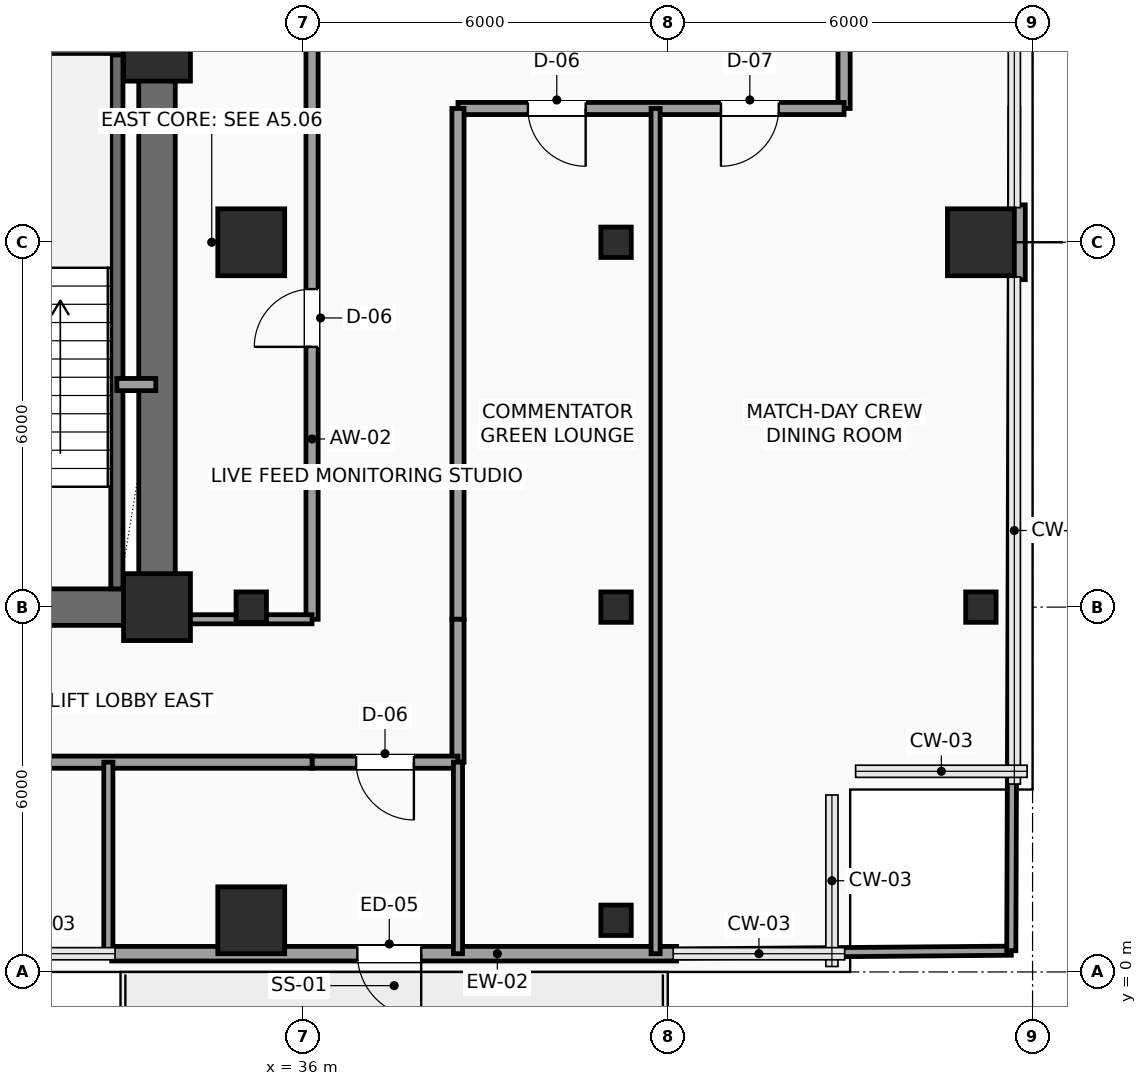
"""IFC4 building model, lengths in metres.
Left out: names, types, materials, properties, quantities, classifications, styles, units other than length and angle.
Written with IfcOpenShell. Run it as: python <this file> out.ifc"""

import sys

from ifc_helpers import new_model, si_unit, direction, frame, frame_2d, origin, origin_2d, place, context, subcontext, project, spatial, rectangle, hollow_rectangle, extrude, element, fill, save


model = new_model("IFC4")
c1 = context("Model", 3, precision=1e-05, world=origin(), true_north=direction((0.0, 1.0)))
c2 = subcontext(c1, "Body", "Model", "MODEL_VIEW")
j1 = project(units=[si_unit("LENGTHUNIT", "METRE"), si_unit("PLANEANGLEUNIT", "RADIAN")], contexts=[c1])
p1 = place(None, origin())
s1 = spatial("IfcSite", under=j1, at=p1, CompositionType="ELEMENT")
p2 = place(p1, origin())
s2 = spatial("IfcBuilding", under=s1, at=p2, CompositionType="ELEMENT")
p3 = place(p2, frame((0.0, 0.0, 107.1)))
s3 = spatial("IfcBuildingStorey", under=s2, at=p3, CompositionType="ELEMENT", Elevation=107.1)
for number, where, z_axis, x_axis in (
    (1, (33.6, 6.0, 0.0), (0.0, 0.0, 1.0), (1.0, 0.0, 0.0)),
    (2, (33.6, 15.2, 0.0), (0.0, 0.0, 1.0), (1.0, 0.0, 0.0)),
    (3, (35.15, 0.85, 0.0), (0.0, 0.0, 1.0), (1.0, 0.0, 0.0)),
):
    element("IfcColumn", number, at=place(p3, frame(where, z_axis=z_axis, x_axis=x_axis)), inside=s3, PredefinedType="COLUMN", context=c2, shape_type="SweptSolid", body=[
        extrude(rectangle(XDim=1.1, YDim=1.1, at=origin_2d()), origin(), (0.0, 0.0, 1.0), 3.75),
    ])
p4 = place(p3, frame((35.15, 6.0, 0.0), z_axis=(0.0, 0.0, 1.0), x_axis=(1.0, 0.0, 0.0)))
e4 = element("IfcColumn", 4, at=p4, inside=s3, PredefinedType="COLUMN", context=c2, shape_type="SweptSolid", body=[
    extrude(hollow_rectangle(XDim=0.5, YDim=0.5, WallThickness=0.025, InnerFilletRadius=0.025, OuterFilletRadius=0.04, at=origin_2d()), origin(), (0.0, 0.0, 1.0), 3.75),
])
p5 = place(p3, frame((35.15, 12.0, 0.0), z_axis=(0.0, 0.0, 1.0), x_axis=(1.0, 0.0, 0.0)))
e5 = element("IfcColumn", 5, at=p5, inside=s3, PredefinedType="COLUMN", context=c2, shape_type="SweptSolid", body=[
    extrude(rectangle(XDim=1.1, YDim=1.1, at=origin_2d()), origin(), (0.0, 0.0, 1.0), 3.75),
])
for number, where, z_axis, x_axis in (
    (6, (41.15, 0.85, 0.0), (0.0, 0.0, 1.0), (1.0, 0.0, 0.0)),
    (7, (41.15, 6.0, 0.0), (0.0, 0.0, 1.0), (1.0, 0.0, 0.0)),
    (8, (41.15, 12.0, 0.0), (0.0, 0.0, 1.0), (1.0, 0.0, 0.0)),
    (9, (47.15, 6.0, 0.0), (0.0, 0.0, 1.0), (1.0, 0.0, 0.0)),
):
    element("IfcColumn", number, at=place(p3, frame(where, z_axis=z_axis, x_axis=x_axis)), inside=s3, PredefinedType="COLUMN", context=c2, shape_type="SweptSolid", body=[
        extrude(hollow_rectangle(XDim=0.5, YDim=0.5, WallThickness=0.025, InnerFilletRadius=0.025, OuterFilletRadius=0.04, at=origin_2d()), origin(), (0.0, 0.0, 1.0), 3.75),
    ])
p6 = place(p3, frame((47.15, 12.0, 0.0), z_axis=(0.0, 0.0, 1.0), x_axis=(1.0, 0.0, 0.0)))
e10 = element("IfcColumn", 10, at=p6, inside=s3, PredefinedType="COLUMN", context=c2, shape_type="SweptSolid", body=[
    extrude(rectangle(XDim=1.1, YDim=1.1, at=origin_2d()), origin(), (0.0, 0.0, 1.0), 3.75),
])
p7 = place(p3, frame((42.145, 0.3, 0.0), z_axis=(0.0, 0.0, 1.0), x_axis=(-1.0, 0.0, 0.0)))
e11 = element("IfcWall", 11, at=p7, inside=s3, PredefinedType="SOLIDWALL", context=c2, shape_type="SweptSolid", body=[
    extrude(rectangle(XDim=9.29, YDim=0.24, at=frame_2d((4.645, 0.0))), origin(), (0.0, 0.0, 1.0), 3.475),
])
p8 = place(p7, frame((4.2, 0.0, 0.0)))
e12 = element("IfcOpeningElement", 12, at=p8, cuts=e11, PredefinedType="OPENING", context=c2, shape_type="SweptSolid", body=[
    extrude(rectangle(XDim=1.05, YDim=2.2, at=frame_2d((0.525, 1.1))), frame((0.0, 0.13, 0.0), z_axis=(0.0, -1.0, 0.0), x_axis=(1.0, 0.0, 0.0)), (0.0, 0.0, 1.0), 0.26),
])
p9 = place(p3, frame((47.76, 12.615, 0.0), z_axis=(0.0, 0.0, 1.0), x_axis=(0.0, -1.0, 0.0)))
e13 = element("IfcWall", 13, at=p9, inside=s3, PredefinedType="SOLIDWALL", context=c2, shape_type="SweptSolid", body=[
    extrude(rectangle(XDim=1.23, YDim=0.24, at=frame_2d((0.615, 0.0))), origin(), (0.0, 0.0, 1.0), 3.475),
])
p10 = place(p3, frame((24.0, 6.0, 0.0), z_axis=(0.0, 0.0, 1.0), x_axis=(1.0, 0.0, 0.0)))
e14 = element("IfcWall", 14, at=p10, inside=s3, PredefinedType="SHEAR", context=c2, shape_type="SweptSolid", body=[
    extrude(rectangle(XDim=9.6, YDim=0.6, at=frame_2d((4.8, 0.0))), origin(), (0.0, 0.0, 1.0), 3.475),
])
p11 = place(p3, frame((33.6, 6.0, 0.0), z_axis=(0.0, 0.0, 1.0), x_axis=(0.0, 1.0, 0.0)))
e15 = element("IfcWall", 15, at=p11, inside=s3, PredefinedType="SHEAR", context=c2, shape_type="SweptSolid", body=[
    extrude(rectangle(XDim=12.0, YDim=0.6, at=frame_2d((6.0, 0.0))), origin(), (0.0, 0.0, 1.0), 3.475),
])
p12 = place(p11, frame((10.3, 0.0, 0.0)))
e16 = element("IfcOpeningElement", 16, at=p12, cuts=e15, PredefinedType="OPENING", context=c2, shape_type="SweptSolid", body=[
    extrude(rectangle(XDim=0.9, YDim=2.15, at=frame_2d((0.45, 1.075))), frame((0.0, 0.31, 0.0), z_axis=(0.0, -1.0, 0.0), x_axis=(1.0, 0.0, 0.0)), (0.0, 0.0, 1.0), 0.62),
])
p13 = place(p3, frame((32.94, 6.3, 0.0), z_axis=(0.0, 0.0, 1.0), x_axis=(0.0, 1.0, 0.0)))
e17 = element("IfcWall", 17, at=p13, inside=s3, PredefinedType="SHEAR", context=c2, shape_type="SweptSolid", body=[
    extrude(rectangle(XDim=8.88, YDim=0.2, at=frame_2d((4.44, 0.0))), origin(), (0.0, 0.0, 1.0), 3.475),
])
p14 = place(p3, frame((29.26, 15.18, 0.0), z_axis=(0.0, 0.0, 1.0), x_axis=(1.0, 0.0, 0.0)))
e18 = element("IfcWall", 18, at=p14, inside=s3, PredefinedType="SHEAR", context=c2, shape_type="SweptSolid", body=[
    extrude(rectangle(XDim=4.04, YDim=0.2, at=frame_2d((2.02, 0.0))), origin(), (0.0, 0.0, 1.0), 3.475),
])
p15 = place(p3, frame((32.94, 9.66, 0.0), z_axis=(0.0, 0.0, 1.0), x_axis=(1.0, 0.0, 0.0)))
e19 = element("IfcWall", 19, at=p15, inside=s3, PredefinedType="SOLIDWALL", context=c2, shape_type="SweptSolid", body=[
    extrude(rectangle(XDim=0.64, YDim=0.2, at=frame_2d((0.32, 0.0))), origin(), (0.0, 0.0, 1.0), 3.475),
])
p16 = place(p3, frame((36.15, 5.8, 0.0), z_axis=(0.0, 0.0, 1.0), x_axis=(0.0, 1.0, 0.0)))
e20 = element("IfcWall", 20, at=p16, inside=s3, PredefinedType="PARTITIONING", context=c2, shape_type="SweptSolid", body=[
    extrude(rectangle(XDim=10.08, YDim=0.2, at=frame_2d((5.04, 0.0))), origin(), (0.0, 0.0, 1.0), 3.475),
])
p17 = place(p16, frame((4.48, 0.0, 0.0)))
e21 = element("IfcOpeningElement", 21, at=p17, cuts=e20, PredefinedType="OPENING", context=c2, shape_type="SweptSolid", body=[
    extrude(rectangle(XDim=0.95, YDim=2.15, at=frame_2d((0.475, 1.075))), frame((0.0, 0.11, 0.0), z_axis=(0.0, -1.0, 0.0), x_axis=(1.0, 0.0, 0.0)), (0.0, 0.0, 1.0), 0.22),
])
p18 = place(p3, frame((44.9, 16.55, 0.0), z_axis=(0.0, 0.0, 1.0), x_axis=(0.0, -1.0, 0.0)))
e22 = element("IfcWall", 22, at=p18, inside=s3, PredefinedType="PARTITIONING", context=c2, shape_type="SweptSolid", body=[
    extrude(rectangle(XDim=2.35, YDim=0.2, at=frame_2d((1.175, 0.0))), origin(), (0.0, 0.0, 1.0), 3.475),
])
p19 = place(p3, frame((44.9, 14.2, 0.0), z_axis=(0.0, 0.0, 1.0), x_axis=(-1.0, 0.0, 0.0)))
e23 = element("IfcWall", 23, at=p19, inside=s3, PredefinedType="PARTITIONING", context=c2, shape_type="SweptSolid", body=[
    extrude(rectangle(XDim=6.35, YDim=0.2, at=frame_2d((3.175, 0.0))), origin(), (0.0, 0.0, 1.0), 3.475),
])
p20 = place(p19, frame((4.25, 0.0, 0.0)))
e24 = element("IfcOpeningElement", 24, at=p20, cuts=e23, PredefinedType="OPENING", context=c2, shape_type="SweptSolid", body=[
    extrude(rectangle(XDim=0.95, YDim=2.15, at=frame_2d((0.475, 1.075))), frame((0.0, 0.11, 0.0), z_axis=(0.0, -1.0, 0.0), x_axis=(1.0, 0.0, 0.0)), (0.0, 0.0, 1.0), 0.22),
])
p21 = place(p19, frame((1.075, 0.0, 0.0)))
e25 = element("IfcOpeningElement", 25, at=p21, cuts=e23, PredefinedType="OPENING", context=c2, shape_type="SweptSolid", body=[
    extrude(rectangle(XDim=0.95, YDim=2.15, at=frame_2d((0.475, 1.075))), frame((0.0, 0.11, 0.0), z_axis=(0.0, -1.0, 0.0), x_axis=(1.0, 0.0, 0.0)), (0.0, 0.0, 1.0), 0.22),
])
p22 = place(p3, frame((38.55, 14.2, 0.0), z_axis=(0.0, 0.0, 1.0), x_axis=(0.0, -1.0, 0.0)))
e26 = element("IfcWall", 26, at=p22, inside=s3, PredefinedType="PARTITIONING", context=c2, shape_type="SweptSolid", body=[
    extrude(rectangle(XDim=8.4, YDim=0.2, at=frame_2d((4.2, 0.0))), origin(), (0.0, 0.0, 1.0), 3.475),
])
p23 = place(p3, frame((38.55, 5.8, 0.0), z_axis=(0.0, 0.0, 1.0), x_axis=(0.0, -1.0, 0.0)))
e27 = element("IfcWall", 27, at=p23, inside=s3, PredefinedType="PARTITIONING", context=c2, shape_type="SweptSolid", body=[
    extrude(rectangle(XDim=2.35, YDim=0.2, at=frame_2d((1.175, 0.0))), origin(), (0.0, 0.0, 1.0), 3.475),
])
p24 = place(p3, frame((38.55, 3.45, 0.0), z_axis=(0.0, 0.0, 1.0), x_axis=(-1.0, 0.0, 0.0)))
e28 = element("IfcWall", 28, at=p24, inside=s3, PredefinedType="PARTITIONING", context=c2, shape_type="SweptSolid", body=[
    extrude(rectangle(XDim=2.4, YDim=0.2, at=frame_2d((1.2, 0.0))), origin(), (0.0, 0.0, 1.0), 3.017),
])
p25 = place(p24, frame((0.725, 0.0, 0.0)))
e29 = element("IfcOpeningElement", 29, at=p25, cuts=e28, PredefinedType="OPENING", context=c2, shape_type="SweptSolid", body=[
    extrude(rectangle(XDim=0.95, YDim=2.15, at=frame_2d((0.475, 1.075))), frame((0.0, 0.11, 0.0), z_axis=(0.0, -1.0, 0.0), x_axis=(1.0, 0.0, 0.0)), (0.0, 0.0, 1.0), 0.22),
])
p26 = place(p3, frame((36.15, 3.45, 0.0), z_axis=(0.0, 0.0, 1.0), x_axis=(-1.0, 0.0, 0.0)))
e30 = element("IfcWall", 30, at=p26, inside=s3, PredefinedType="PARTITIONING", context=c2, shape_type="SweptSolid", body=[
    extrude(rectangle(XDim=14.6, YDim=0.2, at=frame_2d((7.3, 0.0))), origin(), (0.0, 0.0, 1.0), 3.017),
])
p27 = place(p26, frame((11.3, 0.0, 0.0)))
e31 = element("IfcOpeningElement", 31, at=p27, cuts=e30, PredefinedType="OPENING", context=c2, shape_type="SweptSolid", body=[
    extrude(rectangle(XDim=0.95, YDim=2.15, at=frame_2d((0.475, 1.075))), frame((0.0, 0.11, 0.0), z_axis=(0.0, -1.0, 0.0), x_axis=(1.0, 0.0, 0.0)), (0.0, 0.0, 1.0), 0.22),
])
p28 = place(p26, frame((5.675, 0.0, 0.0)))
e32 = element("IfcOpeningElement", 32, at=p28, cuts=e30, PredefinedType="OPENING", context=c2, shape_type="SweptSolid", body=[
    extrude(rectangle(XDim=0.95, YDim=2.15, at=frame_2d((0.475, 1.075))), frame((0.0, 0.11, 0.0), z_axis=(0.0, -1.0, 0.0), x_axis=(1.0, 0.0, 0.0)), (0.0, 0.0, 1.0), 0.22),
])
p29 = place(p3, frame((41.8, 0.3, 0.0), z_axis=(0.0, 0.0, 1.0), x_axis=(0.0, 1.0, 0.0)))
e33 = element("IfcWall", 33, at=p29, inside=s3, PredefinedType="PARTITIONING", context=c2, shape_type="SweptSolid", body=[
    extrude(rectangle(XDim=13.9, YDim=0.15, at=frame_2d((6.95, 0.0))), origin(), (0.0, 0.0, 1.0), 3.475),
])
p30 = place(p3, frame((42.145, 0.303, 0.0), z_axis=(0.0, 0.0, 1.0), x_axis=(0.999963369343, 0.008559203933, 0.0)))
e34 = element("IfcWall", 34, at=p30, inside=s3, PredefinedType="PARTITIONING", context=c2, shape_type="SweptSolid", body=[
    extrude(rectangle(XDim=5.505, YDim=0.15, at=frame_2d((2.752, 0.0))), origin(), (0.0, 0.0, 1.0), 3.475),
])
p31 = place(p3, frame((47.65, 0.35, 0.0), z_axis=(0.0, 0.0, 1.0), x_axis=(0.003606251025, 0.999993497456, 0.0)))
e35 = element("IfcWall", 35, at=p31, inside=s3, PredefinedType="PARTITIONING", context=c2, shape_type="SweptSolid", body=[
    extrude(rectangle(XDim=11.035, YDim=0.15, at=frame_2d((5.518, 0.0))), origin(), (0.0, 0.0, 1.0), 3.475),
])
p32 = place(p3, frame((47.694, 12.615, 0.0), z_axis=(0.0, 0.0, 1.0), x_axis=(0.003542799701, 0.999993724265, 0.0)))
e36 = element("IfcWall", 36, at=p32, inside=s3, PredefinedType="PARTITIONING", context=c2, shape_type="SweptSolid", body=[
    extrude(rectangle(XDim=1.585, YDim=0.15, at=frame_2d((0.792, 0.0))), origin(), (0.0, 0.0, 1.0), 3.475),
])
for number, where, z_axis, x_axis in (
    (37, (32.8, 0.3, 0.0), (0.0, 0.0, 1.0), (0.0, 1.0, 0.0)),
    (38, (38.55, 0.3, 0.0), (0.0, 0.0, 1.0), (0.0, 1.0, 0.0)),
):
    element("IfcWall", number, at=place(p3, frame(where, z_axis=z_axis, x_axis=x_axis)), inside=s3, PredefinedType="PARTITIONING", context=c2, shape_type="SweptSolid", body=[
        extrude(rectangle(XDim=3.15, YDim=0.15, at=frame_2d((1.575, 0.0))), origin(), (0.0, 0.0, 1.0), 3.475),
    ])
p33 = place(p3, frame((33.65, 5.8, 0.0), z_axis=(0.0, 0.0, 1.0), x_axis=(1.0, 0.0, 0.0)))
e39 = element("IfcWall", 39, at=p33, inside=s3, PredefinedType="PARTITIONING", context=c2, shape_type="SweptSolid", body=[
    extrude(rectangle(XDim=2.5, YDim=0.15, at=frame_2d((1.25, 0.0))), origin(), (0.0, 0.0, 1.0), 2.967),
])
p34 = place(p8, origin())
e40 = element("IfcDoor", 40, at=p34, inside=s3, OperationType="SINGLE_SWING_LEFT", PredefinedType="DOOR", context=c2, shape_type="SweptSolid", body=[
    extrude(rectangle(XDim=1.05, YDim=2.2, at=frame_2d((0.525, 1.1))), frame((0.0, 0.025, 0.0), z_axis=(0.0, -1.0, 0.0), x_axis=(1.0, 0.0, 0.0)), (0.0, 0.0, 1.0), 0.05),
])
fill(e12, e40)
p35 = place(p17, origin())
e41 = element("IfcDoor", 41, at=p35, inside=s3, OperationType="SINGLE_SWING_LEFT", PredefinedType="DOOR", context=c2, shape_type="SweptSolid", body=[
    extrude(rectangle(XDim=0.95, YDim=2.15, at=frame_2d((0.475, 1.075))), frame((0.0, 0.025, 0.0), z_axis=(0.0, -1.0, 0.0), x_axis=(1.0, 0.0, 0.0)), (0.0, 0.0, 1.0), 0.05),
])
fill(e21, e41)
p36 = place(p20, origin())
e42 = element("IfcDoor", 42, at=p36, inside=s3, OperationType="SINGLE_SWING_LEFT", PredefinedType="DOOR", context=c2, shape_type="SweptSolid", body=[
    extrude(rectangle(XDim=0.95, YDim=2.15, at=frame_2d((0.475, 1.075))), frame((0.0, 0.025, 0.0), z_axis=(0.0, -1.0, 0.0), x_axis=(1.0, 0.0, 0.0)), (0.0, 0.0, 1.0), 0.05),
])
fill(e24, e42)
p37 = place(p21, origin())
e43 = element("IfcDoor", 43, at=p37, inside=s3, OperationType="SINGLE_SWING_RIGHT", PredefinedType="DOOR", context=c2, shape_type="SweptSolid", body=[
    extrude(rectangle(XDim=0.95, YDim=2.15, at=frame_2d((0.475, 1.075))), frame((0.0, 0.025, 0.0), z_axis=(0.0, -1.0, 0.0), x_axis=(1.0, 0.0, 0.0)), (0.0, 0.0, 1.0), 0.05),
])
fill(e25, e43)
p38 = place(p25, origin())
e44 = element("IfcDoor", 44, at=p38, inside=s3, OperationType="SINGLE_SWING_LEFT", PredefinedType="DOOR", context=c2, shape_type="SweptSolid", body=[
    extrude(rectangle(XDim=0.95, YDim=2.15, at=frame_2d((0.475, 1.075))), frame((0.0, 0.025, 0.0), z_axis=(0.0, -1.0, 0.0), x_axis=(1.0, 0.0, 0.0)), (0.0, 0.0, 1.0), 0.05),
])
fill(e29, e44)
save(model, sys.argv[1])
